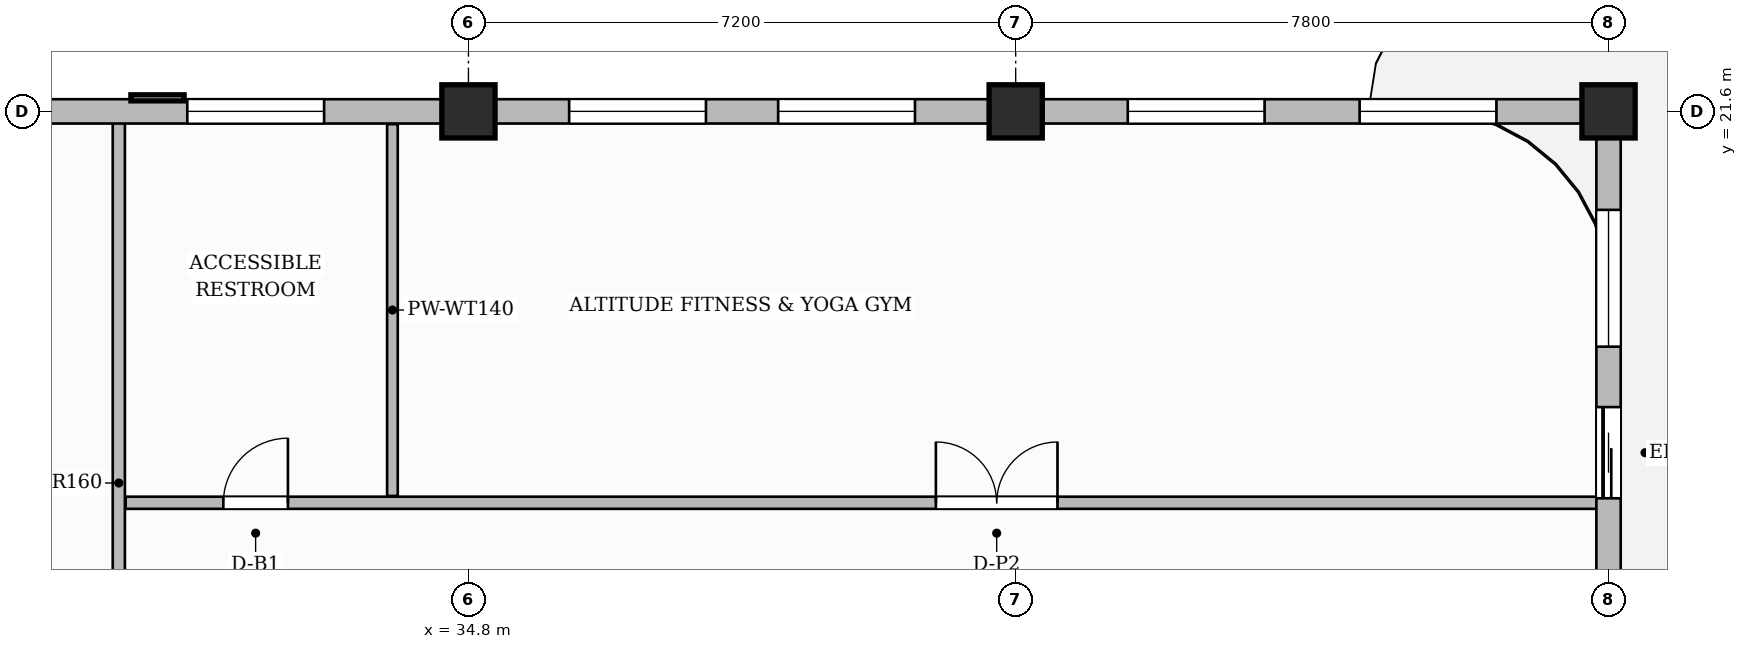
"""IFC4 building model, lengths in metres.
Left out: names, types, materials, properties, quantities, classifications, styles, units other than length and angle.
Written with IfcOpenShell. Run it as: python <this file> out.ifc"""

import sys

from ifc_helpers import new_model, si_unit, direction, frame, frame_2d, origin, origin_2d, place, context, subcontext, project, spatial, rectangle, extrude, source, transform, mapped, element, fill, save


model = new_model("IFC4")
c1 = context("Model", 3, precision=1e-05, world=origin(), true_north=direction((0.0, 1.0)))
c2 = subcontext(c1, "Body", "Model", "MODEL_VIEW")
j1 = project(units=[si_unit("LENGTHUNIT", "METRE"), si_unit("PLANEANGLEUNIT", "RADIAN")], contexts=[c1])
p1 = place(None, origin())
s1 = spatial("IfcSite", under=j1, at=p1, CompositionType="ELEMENT")
p2 = place(p1, origin())
s2 = spatial("IfcBuilding", under=s1, at=p2, CompositionType="ELEMENT")
p3 = place(p2, frame((0.0, 0.0, 278.9)))
s3 = spatial("IfcBuildingStorey", under=s2, at=p3, CompositionType="ELEMENT", Elevation=278.9)
m1 = source(origin(), c2, "Body", "SweptSolid", [
    extrude(rectangle(XDim=0.7, YDim=0.7, at=origin_2d()), origin(), (0.0, 0.0, 1.0), 3.85),
])
for number, where, z_axis, x_axis in (
    (1, (34.8, 21.6, 0.0), (0.0, 0.0, 1.0), (1.0, 0.0, 0.0)),
    (2, (42.0, 21.6, 0.0), (0.0, 0.0, 1.0), (1.0, 0.0, 0.0)),
    (3, (49.8, 21.6, 0.0), (0.0, 0.0, 1.0), (1.0, 0.0, 0.0)),
):
    element("IfcColumn", number, at=place(p3, frame(where, z_axis=z_axis, x_axis=x_axis)), inside=s3, PredefinedType="COLUMN", context=c2, shape_type="MappedRepresentation", body=[
        mapped(m1, transform((0.0, 0.0, 0.0), scale=1.0)),
    ])
p4 = place(p3, frame((30.2, 11.96, 0.0), z_axis=(0.0, 0.0, 1.0), x_axis=(0.0, 1.0, 0.0)))
e4 = element("IfcWall", 4, at=p4, inside=s3, PredefinedType="PARTITIONING", context=c2, shape_type="SweptSolid", body=[
    extrude(rectangle(XDim=9.5, YDim=0.16, at=frame_2d((4.75, 0.0))), origin(), (0.0, 0.0, 1.0), 3.6),
])
p5 = place(p3, frame((30.29, 16.45, 0.0), z_axis=(0.0, 0.0, 1.0), x_axis=(1.0, 0.0, 0.0)))
e5 = element("IfcWall", 5, at=p5, inside=s3, PredefinedType="PARTITIONING", context=c2, shape_type="SweptSolid", body=[
    extrude(rectangle(XDim=19.37, YDim=0.16, at=frame_2d((9.685, 0.0))), origin(), (0.0, 0.0, 1.0), 3.6),
])
p6 = place(p5, frame((1.285, 0.0, 0.0)))
e6 = element("IfcOpeningElement", 6, at=p6, cuts=e5, PredefinedType="OPENING", context=c2, shape_type="SweptSolid", body=[
    extrude(rectangle(XDim=0.85, YDim=2.1, at=frame_2d((0.425, 1.05))), frame((0.0, 0.09, 0.0), z_axis=(0.0, -1.0, 0.0), x_axis=(1.0, 0.0, 0.0)), (0.0, 0.0, 1.0), 0.18),
])
p7 = place(p5, frame((10.66, 0.0, 0.0)))
e7 = element("IfcOpeningElement", 7, at=p7, cuts=e5, PredefinedType="OPENING", context=c2, shape_type="SweptSolid", body=[
    extrude(rectangle(XDim=1.6, YDim=2.4, at=frame_2d((0.8, 1.2))), frame((0.0, 0.09, 0.0), z_axis=(0.0, -1.0, 0.0), x_axis=(1.0, 0.0, 0.0)), (0.0, 0.0, 1.0), 0.18),
])
p8 = place(p3, frame((33.8, 16.54, 0.0), z_axis=(0.0, 0.0, 1.0), x_axis=(0.0, 1.0, 0.0)))
e8 = element("IfcWall", 8, at=p8, inside=s3, PredefinedType="PARTITIONING", context=c2, shape_type="SweptSolid", body=[
    extrude(rectangle(XDim=4.892, YDim=0.14, at=frame_2d((2.446, 0.0))), origin(), (0.0, 0.0, 1.0), 3.6),
])
p9 = place(p3, frame((49.8, 14.62, 0.0), z_axis=(0.0, 0.0, 1.0), x_axis=(0.0, 1.0, 0.0)))
e9 = element("IfcWall", 9, at=p9, inside=s3, PredefinedType="SOLIDWALL", context=c2, shape_type="SweptSolid", body=[
    extrude(rectangle(XDim=6.93, YDim=0.32, at=frame_2d((3.465, 0.0))), origin(), (0.0, 0.0, 1.0), 3.185),
])
p10 = place(p9, frame((1.889, 0.0, 0.0)))
e10 = element("IfcOpeningElement", 10, at=p10, cuts=e9, PredefinedType="OPENING", context=c2, shape_type="SweptSolid", body=[
    extrude(rectangle(XDim=1.2, YDim=2.2, at=frame_2d((0.6, 1.1))), frame((0.0, 0.17, 0.0), z_axis=(0.0, -1.0, 0.0), x_axis=(1.0, 0.0, 0.0)), (0.0, 0.0, 1.0), 0.34),
])
p11 = place(p9, frame((3.884, 0.0, 0.8)))
e11 = element("IfcOpeningElement", 11, at=p11, cuts=e9, PredefinedType="OPENING", context=c2, shape_type="SweptSolid", body=[
    extrude(rectangle(XDim=1.8, YDim=1.85, at=frame_2d((0.9, 0.925))), frame((0.0, 0.17, 0.0), z_axis=(0.0, -1.0, 0.0), x_axis=(1.0, 0.0, 0.0)), (0.0, 0.0, 1.0), 0.34),
])
p12 = place(p3, frame((18.0, 21.6, 0.0), z_axis=(0.0, 0.0, 1.0), x_axis=(1.0, 0.0, 0.0)))
e12 = element("IfcWall", 12, at=p12, inside=s3, PredefinedType="SOLIDWALL", context=c2, shape_type="SweptSolid", body=[
    extrude(rectangle(XDim=31.8, YDim=0.32, at=frame_2d((15.9, 0.0))), origin(), (0.0, 0.0, 1.0), 3.185),
])
p13 = place(p12, frame((0.42, 0.0, 0.0)))
e13 = element("IfcOpeningElement", 13, at=p13, cuts=e12, PredefinedType="OPENING", context=c2, shape_type="SweptSolid", body=[
    extrude(rectangle(XDim=1.2, YDim=2.2, at=frame_2d((0.6, 1.1))), frame((0.0, 0.17, 0.0), z_axis=(0.0, -1.0, 0.0), x_axis=(1.0, 0.0, 0.0)), (0.0, 0.0, 1.0), 0.34),
])
p14 = place(p12, frame((4.896, 0.0, 0.8)))
e14 = element("IfcOpeningElement", 14, at=p14, cuts=e12, PredefinedType="OPENING", context=c2, shape_type="SweptSolid", body=[
    extrude(rectangle(XDim=1.4, YDim=1.85, at=frame_2d((0.7, 0.925))), frame((0.0, 0.17, 0.0), z_axis=(0.0, -1.0, 0.0), x_axis=(1.0, 0.0, 0.0)), (0.0, 0.0, 1.0), 0.34),
])
p15 = place(p12, frame((7.504, 0.0, 0.8)))
e15 = element("IfcOpeningElement", 15, at=p15, cuts=e12, PredefinedType="OPENING", context=c2, shape_type="SweptSolid", body=[
    extrude(rectangle(XDim=1.8, YDim=1.85, at=frame_2d((0.9, 0.925))), frame((0.0, 0.17, 0.0), z_axis=(0.0, -1.0, 0.0), x_axis=(1.0, 0.0, 0.0)), (0.0, 0.0, 1.0), 0.34),
])
p16 = place(p12, frame((13.101, 0.0, 0.8)))
e16 = element("IfcOpeningElement", 16, at=p16, cuts=e12, PredefinedType="OPENING", context=c2, shape_type="SweptSolid", body=[
    extrude(rectangle(XDim=1.8, YDim=1.85, at=frame_2d((0.9, 0.925))), frame((0.0, 0.17, 0.0), z_axis=(0.0, -1.0, 0.0), x_axis=(1.0, 0.0, 0.0)), (0.0, 0.0, 1.0), 0.34),
])
p17 = place(p12, frame((18.125, 0.0, 0.8)))
e17 = element("IfcOpeningElement", 17, at=p17, cuts=e12, PredefinedType="OPENING", context=c2, shape_type="SweptSolid", body=[
    extrude(rectangle(XDim=1.8, YDim=1.85, at=frame_2d((0.9, 0.925))), frame((0.0, 0.17, 0.0), z_axis=(0.0, -1.0, 0.0), x_axis=(1.0, 0.0, 0.0)), (0.0, 0.0, 1.0), 0.34),
])
p18 = place(p12, frame((20.875, 0.0, 0.8)))
e18 = element("IfcOpeningElement", 18, at=p18, cuts=e12, PredefinedType="OPENING", context=c2, shape_type="SweptSolid", body=[
    extrude(rectangle(XDim=1.8, YDim=1.85, at=frame_2d((0.9, 0.925))), frame((0.0, 0.17, 0.0), z_axis=(0.0, -1.0, 0.0), x_axis=(1.0, 0.0, 0.0)), (0.0, 0.0, 1.0), 0.34),
])
p19 = place(p12, frame((25.475, 0.0, 0.8)))
e19 = element("IfcOpeningElement", 19, at=p19, cuts=e12, PredefinedType="OPENING", context=c2, shape_type="SweptSolid", body=[
    extrude(rectangle(XDim=1.8, YDim=1.85, at=frame_2d((0.9, 0.925))), frame((0.0, 0.17, 0.0), z_axis=(0.0, -1.0, 0.0), x_axis=(1.0, 0.0, 0.0)), (0.0, 0.0, 1.0), 0.34),
])
p20 = place(p12, frame((28.525, 0.0, 0.8)))
e20 = element("IfcOpeningElement", 20, at=p20, cuts=e12, PredefinedType="OPENING", context=c2, shape_type="SweptSolid", body=[
    extrude(rectangle(XDim=1.8, YDim=1.85, at=frame_2d((0.9, 0.925))), frame((0.0, 0.17, 0.0), z_axis=(0.0, -1.0, 0.0), x_axis=(1.0, 0.0, 0.0)), (0.0, 0.0, 1.0), 0.34),
])
m2 = source(origin(), c2, "Body", "SweptSolid", [
    extrude(rectangle(XDim=0.85, YDim=2.1, at=frame_2d((0.425, 1.05))), frame((0.0, 0.025, 0.0), z_axis=(0.0, -1.0, 0.0), x_axis=(1.0, 0.0, 0.0)), (0.0, 0.0, 1.0), 0.05),
])
p21 = place(p6, origin())
e21 = element("IfcDoor", 21, at=p21, inside=s3, OperationType="SINGLE_SWING_RIGHT", PredefinedType="DOOR", context=c2, shape_type="MappedRepresentation", body=[
    mapped(m2, transform((0.0, 0.0, 0.0), scale=1.0)),
])
fill(e6, e21)
m3 = source(origin(), c2, "Body", "SweptSolid", [
    extrude(rectangle(XDim=1.6, YDim=2.4, at=frame_2d((0.8, 1.2))), frame((0.0, 0.025, 0.0), z_axis=(0.0, -1.0, 0.0), x_axis=(1.0, 0.0, 0.0)), (0.0, 0.0, 1.0), 0.05),
])
p22 = place(p7, origin())
e22 = element("IfcDoor", 22, at=p22, inside=s3, OperationType="DOUBLE_DOOR_SINGLE_SWING", PredefinedType="DOOR", context=c2, shape_type="MappedRepresentation", body=[
    mapped(m3, transform((0.0, 0.0, 0.0), scale=1.0)),
])
fill(e7, e22)
m4 = source(origin(), c2, "Body", "SweptSolid", [
    extrude(rectangle(XDim=1.2, YDim=2.2, at=frame_2d((0.6, 1.1))), frame((0.0, 0.025, 0.0), z_axis=(0.0, -1.0, 0.0), x_axis=(1.0, 0.0, 0.0)), (0.0, 0.0, 1.0), 0.05),
])
p23 = place(p10, origin())
e23 = element("IfcDoor", 23, at=p23, inside=s3, OperationType="SLIDING_TO_LEFT", PredefinedType="DOOR", context=c2, shape_type="MappedRepresentation", body=[
    mapped(m4, transform((0.0, 0.0, 0.0), scale=1.0)),
])
fill(e10, e23)
m5 = source(origin(), c2, "Body", "SweptSolid", [
    extrude(rectangle(XDim=1.8, YDim=1.85, at=frame_2d((0.9, 0.925))), frame((0.0, 0.03, 0.0), z_axis=(0.0, -1.0, 0.0), x_axis=(1.0, 0.0, 0.0)), (0.0, 0.0, 1.0), 0.06),
])
p24 = place(p11, origin())
e24 = element("IfcWindow", 24, at=p24, inside=s3, PartitioningType="DOUBLE_PANEL_VERTICAL", PredefinedType="WINDOW", context=c2, shape_type="MappedRepresentation", body=[
    mapped(m5, transform((0.0, 0.0, 0.0), scale=1.0)),
])
fill(e11, e24)
p25 = place(p16, origin())
e25 = element("IfcWindow", 25, at=p25, inside=s3, PartitioningType="DOUBLE_PANEL_VERTICAL", PredefinedType="WINDOW", context=c2, shape_type="MappedRepresentation", body=[
    mapped(m5, transform((0.0, 0.0, 0.0), scale=1.0)),
])
fill(e16, e25)
p26 = place(p17, origin())
e26 = element("IfcWindow", 26, at=p26, inside=s3, PartitioningType="DOUBLE_PANEL_VERTICAL", PredefinedType="WINDOW", context=c2, shape_type="MappedRepresentation", body=[
    mapped(m5, transform((0.0, 0.0, 0.0), scale=1.0)),
])
fill(e17, e26)
p27 = place(p18, origin())
e27 = element("IfcWindow", 27, at=p27, inside=s3, PartitioningType="DOUBLE_PANEL_VERTICAL", PredefinedType="WINDOW", context=c2, shape_type="MappedRepresentation", body=[
    mapped(m5, transform((0.0, 0.0, 0.0), scale=1.0)),
])
fill(e18, e27)
p28 = place(p19, origin())
e28 = element("IfcWindow", 28, at=p28, inside=s3, PartitioningType="DOUBLE_PANEL_VERTICAL", PredefinedType="WINDOW", context=c2, shape_type="MappedRepresentation", body=[
    mapped(m5, transform((0.0, 0.0, 0.0), scale=1.0)),
])
fill(e19, e28)
p29 = place(p20, origin())
e29 = element("IfcWindow", 29, at=p29, inside=s3, PartitioningType="DOUBLE_PANEL_VERTICAL", PredefinedType="WINDOW", context=c2, shape_type="MappedRepresentation", body=[
    mapped(m5, transform((0.0, 0.0, 0.0), scale=1.0)),
])
fill(e20, e29)
save(model, sys.argv[1])
